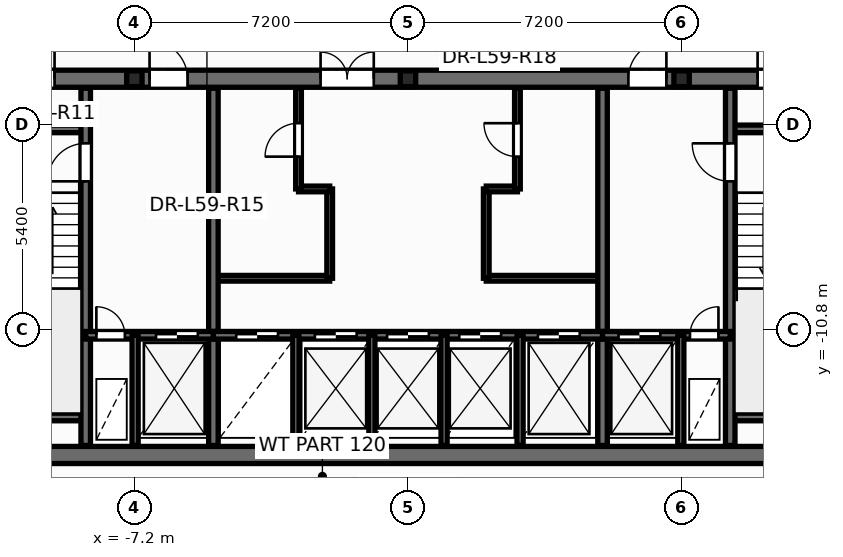
"""IFC4 building model, lengths in metres.
Left out: names, types, materials, properties, quantities, classifications, styles, units other than length and angle.
Written with IfcOpenShell. Run it as: python <this file> out.ifc"""

import sys

from ifc_helpers import new_model, si_unit, direction, frame, frame_2d, origin, origin_2d, place, context, subcontext, project, spatial, rectangle, i_section, extrude, element, fill, save


model = new_model("IFC4")
c1 = context("Model", 3, precision=1e-05, world=origin(), true_north=direction((0.0, 1.0)))
c2 = subcontext(c1, "Body", "Model", "MODEL_VIEW")
j1 = project(units=[si_unit("LENGTHUNIT", "METRE"), si_unit("PLANEANGLEUNIT", "RADIAN")], contexts=[c1])
p1 = place(None, origin())
s1 = spatial("IfcSite", under=j1, at=p1, CompositionType="ELEMENT")
p2 = place(p1, origin())
s2 = spatial("IfcBuilding", under=s1, at=p2, CompositionType="ELEMENT")
p3 = place(p2, frame((0.0, 0.0, 225.3)))
s3 = spatial("IfcBuildingStorey", under=s2, at=p3, CompositionType="ELEMENT", Elevation=225.3)
for number, where, z_axis, x_axis in (
    (1, (-7.2, -4.2, 0.0), (0.0, 0.0, 1.0), (1.0, 0.0, 0.0)),
    (2, (0.0, -4.2, 0.0), (0.0, 0.0, 1.0), (1.0, 0.0, 0.0)),
    (3, (7.2, -4.2, 0.0), (0.0, 0.0, 1.0), (1.0, 0.0, 0.0)),
):
    element("IfcColumn", number, at=place(p3, frame(where, z_axis=z_axis, x_axis=x_axis)), inside=s3, PredefinedType="PILASTER", context=c2, shape_type="SweptSolid", body=[
        extrude(i_section(OverallWidth=0.405, OverallDepth=0.414, WebThickness=0.022, FlangeThickness=0.032, at=origin_2d()), origin(), (0.0, 0.0, 1.0), 3.6),
    ])
p4 = place(p3, frame((-5.12, -9.45, 0.0), z_axis=(0.0, 0.0, 1.0), x_axis=(1.0, 0.0, 0.0)))
e4 = element("IfcWall", 4, at=p4, inside=s3, PredefinedType="PARTITIONING", context=c2, shape_type="SweptSolid", body=[
    extrude(rectangle(XDim=3.06, YDim=0.15, at=frame_2d((1.53, 0.0))), origin(), (0.0, 0.0, 1.0), 3.32),
])
p5 = place(p3, frame((-2.06, -9.45, 0.0), z_axis=(0.0, 0.0, 1.0), x_axis=(0.0, 1.0, 0.0)))
e5 = element("IfcWall", 5, at=p5, inside=s3, PredefinedType="PARTITIONING", context=c2, shape_type="SweptSolid", body=[
    extrude(rectangle(XDim=2.35, YDim=0.15, at=frame_2d((1.175, 0.0))), origin(), (0.0, 0.0, 1.0), 3.32),
])
p6 = place(p3, frame((-2.88, -7.1, 0.0), z_axis=(0.0, 0.0, 1.0), x_axis=(1.0, 0.0, 0.0)))
e6 = element("IfcWall", 6, at=p6, inside=s3, PredefinedType="PARTITIONING", context=c2, shape_type="SweptSolid", body=[
    extrude(rectangle(XDim=0.82, YDim=0.15, at=frame_2d((0.41, 0.0))), origin(), (0.0, 0.0, 1.0), 3.32),
])
p7 = place(p3, frame((-2.88, -7.1, 0.0), z_axis=(0.0, 0.0, 1.0), x_axis=(0.0, 1.0, 0.0)))
e7 = element("IfcWall", 7, at=p7, inside=s3, PredefinedType="PARTITIONING", context=c2, shape_type="SweptSolid", body=[
    extrude(rectangle(XDim=2.65, YDim=0.15, at=frame_2d((1.325, 0.0))), origin(), (0.0, 0.0, 1.0), 3.32),
])
p8 = place(p7, frame((0.85, 0.0, 0.0)))
e8 = element("IfcOpeningElement", 8, at=p8, cuts=e7, PredefinedType="OPENING", context=c2, shape_type="SweptSolid", body=[
    extrude(rectangle(XDim=0.886, YDim=2.104, at=frame_2d((0.44, 1.052))), frame((0.0, 0.085, 0.0), z_axis=(0.0, -1.0, 0.0), x_axis=(1.0, 0.0, 0.0)), (0.0, 0.0, 1.0), 0.17),
])
p9 = place(p3, frame((2.06, -9.45, 0.0), z_axis=(0.0, 0.0, 1.0), x_axis=(1.0, 0.0, 0.0)))
e9 = element("IfcWall", 9, at=p9, inside=s3, PredefinedType="PARTITIONING", context=c2, shape_type="SweptSolid", body=[
    extrude(rectangle(XDim=3.06, YDim=0.15, at=frame_2d((1.53, 0.0))), origin(), (0.0, 0.0, 1.0), 3.32),
])
p10 = place(p3, frame((2.06, -9.45, 0.0), z_axis=(0.0, 0.0, 1.0), x_axis=(0.0, 1.0, 0.0)))
e10 = element("IfcWall", 10, at=p10, inside=s3, PredefinedType="PARTITIONING", context=c2, shape_type="SweptSolid", body=[
    extrude(rectangle(XDim=2.35, YDim=0.15, at=frame_2d((1.175, 0.0))), origin(), (0.0, 0.0, 1.0), 3.32),
])
p11 = place(p3, frame((2.06, -7.1, 0.0), z_axis=(0.0, 0.0, 1.0), x_axis=(1.0, 0.0, 0.0)))
e11 = element("IfcWall", 11, at=p11, inside=s3, PredefinedType="PARTITIONING", context=c2, shape_type="SweptSolid", body=[
    extrude(rectangle(XDim=0.82, YDim=0.15, at=frame_2d((0.41, 0.0))), origin(), (0.0, 0.0, 1.0), 3.32),
])
p12 = place(p3, frame((2.88, -7.1, 0.0), z_axis=(0.0, 0.0, 1.0), x_axis=(0.0, 1.0, 0.0)))
e12 = element("IfcWall", 12, at=p12, inside=s3, PredefinedType="PARTITIONING", context=c2, shape_type="SweptSolid", body=[
    extrude(rectangle(XDim=2.65, YDim=0.15, at=frame_2d((1.325, 0.0))), origin(), (0.0, 0.0, 1.0), 3.32),
])
p13 = place(p12, frame((0.85, 0.0, 0.0)))
e13 = element("IfcOpeningElement", 13, at=p13, cuts=e12, PredefinedType="OPENING", context=c2, shape_type="SweptSolid", body=[
    extrude(rectangle(XDim=0.886, YDim=2.104, at=frame_2d((0.44, 1.052))), frame((0.0, 0.085, 0.0), z_axis=(0.0, -1.0, 0.0), x_axis=(1.0, 0.0, 0.0)), (0.0, 0.0, 1.0), 0.17),
])
p14 = place(p3, frame((-12.65, -14.1, 0.0), z_axis=(0.0, 0.0, 1.0), x_axis=(1.0, 0.0, 0.0)))
e14 = element("IfcWall", 14, at=p14, inside=s3, PredefinedType="SHEAR", context=c2, shape_type="SweptSolid", body=[
    extrude(rectangle(XDim=25.3, YDim=0.45, at=frame_2d((12.65, 0.0))), origin(), (0.0, 0.0, 1.0), 3.6),
])
p15 = place(p3, frame((-12.65, -4.2, 0.0), z_axis=(0.0, 0.0, 1.0), x_axis=(1.0, 0.0, 0.0)))
e15 = element("IfcWall", 15, at=p15, inside=s3, PredefinedType="SHEAR", context=c2, shape_type="SweptSolid", body=[
    extrude(rectangle(XDim=25.3, YDim=0.45, at=frame_2d((12.65, 0.0))), origin(), (0.0, 0.0, 1.0), 3.6),
])
p16 = place(p15, frame((0.95, 0.0, 0.0)))
e16 = element("IfcOpeningElement", 16, at=p16, cuts=e15, PredefinedType="OPENING", context=c2, shape_type="SweptSolid", body=[
    extrude(rectangle(XDim=0.756, YDim=2.054, at=frame_2d((0.375, 1.027))), frame((0.0, 0.235, 0.0), z_axis=(0.0, -1.0, 0.0), x_axis=(1.0, 0.0, 0.0)), (0.0, 0.0, 1.0), 0.47),
])
p17 = place(p15, frame((2.6, 0.0, 0.0)))
e17 = element("IfcOpeningElement", 17, at=p17, cuts=e15, PredefinedType="OPENING", context=c2, shape_type="SweptSolid", body=[
    extrude(rectangle(XDim=0.756, YDim=2.054, at=frame_2d((0.375, 1.027))), frame((0.0, 0.235, 0.0), z_axis=(0.0, -1.0, 0.0), x_axis=(1.0, 0.0, 0.0)), (0.0, 0.0, 1.0), 0.47),
])
p18 = place(p15, frame((21.85, 0.0, 0.0)))
e18 = element("IfcOpeningElement", 18, at=p18, cuts=e15, PredefinedType="OPENING", context=c2, shape_type="SweptSolid", body=[
    extrude(rectangle(XDim=0.756, YDim=2.054, at=frame_2d((0.375, 1.027))), frame((0.0, 0.235, 0.0), z_axis=(0.0, -1.0, 0.0), x_axis=(1.0, 0.0, 0.0)), (0.0, 0.0, 1.0), 0.47),
])
p19 = place(p15, frame((23.5, 0.0, 0.0)))
e19 = element("IfcOpeningElement", 19, at=p19, cuts=e15, PredefinedType="OPENING", context=c2, shape_type="SweptSolid", body=[
    extrude(rectangle(XDim=0.756, YDim=2.054, at=frame_2d((0.375, 1.027))), frame((0.0, 0.235, 0.0), z_axis=(0.0, -1.0, 0.0), x_axis=(1.0, 0.0, 0.0)), (0.0, 0.0, 1.0), 0.47),
])
p20 = place(p15, frame((5.85, 0.0, 0.0)))
e20 = element("IfcOpeningElement", 20, at=p20, cuts=e15, PredefinedType="OPENING", context=c2, shape_type="SweptSolid", body=[
    extrude(rectangle(XDim=1.006, YDim=2.104, at=frame_2d((0.5, 1.052))), frame((0.0, 0.235, 0.0), z_axis=(0.0, -1.0, 0.0), x_axis=(1.0, 0.0, 0.0)), (0.0, 0.0, 1.0), 0.47),
])
p21 = place(p15, frame((10.35, 0.0, 0.0)))
e21 = element("IfcOpeningElement", 21, at=p21, cuts=e15, PredefinedType="OPENING", context=c2, shape_type="SweptSolid", body=[
    extrude(rectangle(XDim=1.406, YDim=2.154, at=frame_2d((0.7, 1.077))), frame((0.0, 0.235, 0.0), z_axis=(0.0, -1.0, 0.0), x_axis=(1.0, 0.0, 0.0)), (0.0, 0.0, 1.0), 0.47),
])
p22 = place(p15, frame((18.45, 0.0, 0.0)))
e22 = element("IfcOpeningElement", 22, at=p22, cuts=e15, PredefinedType="OPENING", context=c2, shape_type="SweptSolid", body=[
    extrude(rectangle(XDim=1.006, YDim=2.104, at=frame_2d((0.5, 1.052))), frame((0.0, 0.235, 0.0), z_axis=(0.0, -1.0, 0.0), x_axis=(1.0, 0.0, 0.0)), (0.0, 0.0, 1.0), 0.47),
])
for number, where, z_axis, x_axis in (
    (23, (-12.35, -5.52, 0.0), (0.0, 0.0, 1.0), (1.0, 0.0, 0.0)),
    (24, (-12.35, -13.1, 0.0), (0.0, 0.0, 1.0), (1.0, 0.0, 0.0)),
    (25, (8.48, -5.52, 0.0), (0.0, 0.0, 1.0), (1.0, 0.0, 0.0)),
    (26, (8.48, -13.1, 0.0), (0.0, 0.0, 1.0), (1.0, 0.0, 0.0)),
):
    element("IfcWall", number, at=place(p3, frame(where, z_axis=z_axis, x_axis=x_axis)), inside=s3, PredefinedType="SOLIDWALL", context=c2, shape_type="SweptSolid", body=[
        extrude(rectangle(XDim=3.87, YDim=0.2, at=frame_2d((1.935, 0.0))), origin(), (0.0, 0.0, 1.0), 3.6),
    ])
p23 = place(p3, frame((-8.48, -13.85, 0.0), z_axis=(0.0, 0.0, 1.0), x_axis=(0.0, 1.0, 0.0)))
e27 = element("IfcWall", 27, at=p23, inside=s3, PredefinedType="SHEAR", context=c2, shape_type="SweptSolid", body=[
    extrude(rectangle(XDim=9.4, YDim=0.25, at=frame_2d((4.7, 0.0))), origin(), (0.0, 0.0, 1.0), 3.6),
])
p24 = place(p23, frame((6.95, 0.0, 0.0)))
e28 = element("IfcOpeningElement", 28, at=p24, cuts=e27, PredefinedType="OPENING", context=c2, shape_type="SweptSolid", body=[
    extrude(rectangle(XDim=1.006, YDim=2.104, at=frame_2d((0.5, 1.052))), frame((0.0, 0.135, 0.0), z_axis=(0.0, -1.0, 0.0), x_axis=(1.0, 0.0, 0.0)), (0.0, 0.0, 1.0), 0.27),
])
p25 = place(p3, frame((8.48, -13.85, 0.0), z_axis=(0.0, 0.0, 1.0), x_axis=(0.0, 1.0, 0.0)))
e29 = element("IfcWall", 29, at=p25, inside=s3, PredefinedType="SHEAR", context=c2, shape_type="SweptSolid", body=[
    extrude(rectangle(XDim=9.4, YDim=0.25, at=frame_2d((4.7, 0.0))), origin(), (0.0, 0.0, 1.0), 3.6),
])
p26 = place(p25, frame((6.95, 0.0, 0.0)))
e30 = element("IfcOpeningElement", 30, at=p26, cuts=e29, PredefinedType="OPENING", context=c2, shape_type="SweptSolid", body=[
    extrude(rectangle(XDim=1.006, YDim=2.104, at=frame_2d((0.5, 1.052))), frame((0.0, 0.135, 0.0), z_axis=(0.0, -1.0, 0.0), x_axis=(1.0, 0.0, 0.0)), (0.0, 0.0, 1.0), 0.27),
])
for number, where, z_axis, x_axis in (
    (31, (-5.12, -13.85, 0.0), (0.0, 0.0, 1.0), (0.0, 1.0, 0.0)),
    (32, (5.12, -13.85, 0.0), (0.0, 0.0, 1.0), (0.0, 1.0, 0.0)),
):
    element("IfcWall", number, at=place(p3, frame(where, z_axis=z_axis, x_axis=x_axis)), inside=s3, PredefinedType="SHEAR", context=c2, shape_type="SweptSolid", body=[
        extrude(rectangle(XDim=9.4, YDim=0.25, at=frame_2d((4.7, 0.0))), origin(), (0.0, 0.0, 1.0), 3.6),
    ])
p27 = place(p3, frame((-8.48, -10.95, 0.0), z_axis=(0.0, 0.0, 1.0), x_axis=(1.0, 0.0, 0.0)))
e33 = element("IfcWall", 33, at=p27, inside=s3, PredefinedType="SOLIDWALL", context=c2, shape_type="SweptSolid", body=[
    extrude(rectangle(XDim=3.36, YDim=0.2, at=frame_2d((1.68, 0.0))), origin(), (0.0, 0.0, 1.0), 3.6),
])
p28 = place(p27, frame((0.28, 0.0, 0.0)))
e34 = element("IfcOpeningElement", 34, at=p28, cuts=e33, PredefinedType="OPENING", context=c2, shape_type="SweptSolid", body=[
    extrude(rectangle(XDim=0.756, YDim=2.054, at=frame_2d((0.375, 1.027))), frame((0.0, 0.11, 0.0), z_axis=(0.0, -1.0, 0.0), x_axis=(1.0, 0.0, 0.0)), (0.0, 0.0, 1.0), 0.22),
])
p29 = place(p27, frame((1.85, 0.0, 0.0)))
e35 = element("IfcOpeningElement", 35, at=p29, cuts=e33, PredefinedType="OPENING", context=c2, shape_type="SweptSolid", body=[
    extrude(rectangle(XDim=1.106, YDim=2.104, at=frame_2d((0.55, 1.052))), frame((0.0, 0.11, 0.0), z_axis=(0.0, -1.0, 0.0), x_axis=(1.0, 0.0, 0.0)), (0.0, 0.0, 1.0), 0.22),
])
p30 = place(p3, frame((-5.12, -10.95, 0.0), z_axis=(0.0, 0.0, 1.0), x_axis=(1.0, 0.0, 0.0)))
e36 = element("IfcWall", 36, at=p30, inside=s3, PredefinedType="SOLIDWALL", context=c2, shape_type="SweptSolid", body=[
    extrude(rectangle(XDim=10.24, YDim=0.2, at=frame_2d((5.12, 0.0))), origin(), (0.0, 0.0, 1.0), 3.6),
])
p31 = place(p30, frame((0.6, 0.0, 0.0)))
e37 = element("IfcOpeningElement", 37, at=p31, cuts=e36, PredefinedType="OPENING", context=c2, shape_type="SweptSolid", body=[
    extrude(rectangle(XDim=1.106, YDim=2.104, at=frame_2d((0.55, 1.052))), frame((0.0, 0.11, 0.0), z_axis=(0.0, -1.0, 0.0), x_axis=(1.0, 0.0, 0.0)), (0.0, 0.0, 1.0), 0.22),
])
p32 = place(p30, frame((2.67, 0.0, 0.0)))
e38 = element("IfcOpeningElement", 38, at=p32, cuts=e36, PredefinedType="OPENING", context=c2, shape_type="SweptSolid", body=[
    extrude(rectangle(XDim=1.106, YDim=2.104, at=frame_2d((0.55, 1.052))), frame((0.0, 0.11, 0.0), z_axis=(0.0, -1.0, 0.0), x_axis=(1.0, 0.0, 0.0)), (0.0, 0.0, 1.0), 0.22),
])
p33 = place(p30, frame((4.57, 0.0, 0.0)))
e39 = element("IfcOpeningElement", 39, at=p33, cuts=e36, PredefinedType="OPENING", context=c2, shape_type="SweptSolid", body=[
    extrude(rectangle(XDim=1.106, YDim=2.104, at=frame_2d((0.55, 1.052))), frame((0.0, 0.11, 0.0), z_axis=(0.0, -1.0, 0.0), x_axis=(1.0, 0.0, 0.0)), (0.0, 0.0, 1.0), 0.22),
])
p34 = place(p30, frame((6.47, 0.0, 0.0)))
e40 = element("IfcOpeningElement", 40, at=p34, cuts=e36, PredefinedType="OPENING", context=c2, shape_type="SweptSolid", body=[
    extrude(rectangle(XDim=1.106, YDim=2.104, at=frame_2d((0.55, 1.052))), frame((0.0, 0.11, 0.0), z_axis=(0.0, -1.0, 0.0), x_axis=(1.0, 0.0, 0.0)), (0.0, 0.0, 1.0), 0.22),
])
p35 = place(p30, frame((8.54, 0.0, 0.0)))
e41 = element("IfcOpeningElement", 41, at=p35, cuts=e36, PredefinedType="OPENING", context=c2, shape_type="SweptSolid", body=[
    extrude(rectangle(XDim=1.106, YDim=2.104, at=frame_2d((0.55, 1.052))), frame((0.0, 0.11, 0.0), z_axis=(0.0, -1.0, 0.0), x_axis=(1.0, 0.0, 0.0)), (0.0, 0.0, 1.0), 0.22),
])
p36 = place(p3, frame((5.12, -10.95, 0.0), z_axis=(0.0, 0.0, 1.0), x_axis=(1.0, 0.0, 0.0)))
e42 = element("IfcWall", 42, at=p36, inside=s3, PredefinedType="SOLIDWALL", context=c2, shape_type="SweptSolid", body=[
    extrude(rectangle(XDim=3.36, YDim=0.2, at=frame_2d((1.68, 0.0))), origin(), (0.0, 0.0, 1.0), 3.6),
])
p37 = place(p36, frame((0.42, 0.0, 0.0)))
e43 = element("IfcOpeningElement", 43, at=p37, cuts=e42, PredefinedType="OPENING", context=c2, shape_type="SweptSolid", body=[
    extrude(rectangle(XDim=1.106, YDim=2.104, at=frame_2d((0.55, 1.052))), frame((0.0, 0.11, 0.0), z_axis=(0.0, -1.0, 0.0), x_axis=(1.0, 0.0, 0.0)), (0.0, 0.0, 1.0), 0.22),
])
p38 = place(p36, frame((2.3, 0.0, 0.0)))
e44 = element("IfcOpeningElement", 44, at=p38, cuts=e42, PredefinedType="OPENING", context=c2, shape_type="SweptSolid", body=[
    extrude(rectangle(XDim=0.756, YDim=2.054, at=frame_2d((0.375, 1.027))), frame((0.0, 0.11, 0.0), z_axis=(0.0, -1.0, 0.0), x_axis=(1.0, 0.0, 0.0)), (0.0, 0.0, 1.0), 0.22),
])
for number, where, z_axis, x_axis in (
    (45, (-7.18, -13.85, 0.0), (0.0, 0.0, 1.0), (0.0, 1.0, 0.0)),
    (46, (7.18, -13.85, 0.0), (0.0, 0.0, 1.0), (0.0, 1.0, 0.0)),
    (47, (-2.95, -13.85, 0.0), (0.0, 0.0, 1.0), (0.0, 1.0, 0.0)),
    (48, (2.95, -13.85, 0.0), (0.0, 0.0, 1.0), (0.0, 1.0, 0.0)),
    (49, (-0.95, -13.85, 0.0), (0.0, 0.0, 1.0), (0.0, 1.0, 0.0)),
    (50, (0.95, -13.85, 0.0), (0.0, 0.0, 1.0), (0.0, 1.0, 0.0)),
):
    element("IfcWall", number, at=place(p3, frame(where, z_axis=z_axis, x_axis=x_axis)), inside=s3, PredefinedType="PARTITIONING", context=c2, shape_type="SweptSolid", body=[
        extrude(rectangle(XDim=2.9, YDim=0.16, at=frame_2d((1.45, 0.0))), origin(), (0.0, 0.0, 1.0), 2.545),
    ])
p39 = place(p8, origin())
e51 = element("IfcDoor", 51, at=p39, inside=s3, OperationType="SINGLE_SWING_LEFT", PredefinedType="DOOR", context=c2, shape_type="SweptSolid", body=[
    extrude(rectangle(XDim=0.88, YDim=2.1, at=frame_2d((0.44, 1.05))), frame((0.0, 0.025, 0.0), z_axis=(0.0, -1.0, 0.0), x_axis=(1.0, 0.0, 0.0)), (0.0, 0.0, 1.0), 0.05),
])
fill(e8, e51)
p40 = place(p13, origin())
e52 = element("IfcDoor", 52, at=p40, inside=s3, OperationType="SINGLE_SWING_RIGHT", PredefinedType="DOOR", context=c2, shape_type="SweptSolid", body=[
    extrude(rectangle(XDim=0.88, YDim=2.1, at=frame_2d((0.44, 1.05))), frame((0.0, 0.025, 0.0), z_axis=(0.0, -1.0, 0.0), x_axis=(1.0, 0.0, 0.0)), (0.0, 0.0, 1.0), 0.05),
])
fill(e13, e52)
p41 = place(p24, origin())
e53 = element("IfcDoor", 53, at=p41, inside=s3, OperationType="SINGLE_SWING_LEFT", PredefinedType="DOOR", context=c2, shape_type="SweptSolid", body=[
    extrude(rectangle(XDim=1.0, YDim=2.1, at=frame_2d((0.5, 1.05))), frame((0.0, 0.025, 0.0), z_axis=(0.0, -1.0, 0.0), x_axis=(1.0, 0.0, 0.0)), (0.0, 0.0, 1.0), 0.05),
])
fill(e28, e53)
p42 = place(p26, origin())
e54 = element("IfcDoor", 54, at=p42, inside=s3, OperationType="SINGLE_SWING_RIGHT", PredefinedType="DOOR", context=c2, shape_type="SweptSolid", body=[
    extrude(rectangle(XDim=1.0, YDim=2.1, at=frame_2d((0.5, 1.05))), frame((0.0, 0.025, 0.0), z_axis=(0.0, -1.0, 0.0), x_axis=(1.0, 0.0, 0.0)), (0.0, 0.0, 1.0), 0.05),
])
fill(e30, e54)
p43 = place(p28, origin())
e55 = element("IfcDoor", 55, at=p43, inside=s3, OperationType="SINGLE_SWING_LEFT", PredefinedType="DOOR", context=c2, shape_type="SweptSolid", body=[
    extrude(rectangle(XDim=0.75, YDim=2.05, at=frame_2d((0.375, 1.025))), frame((0.0, 0.025, 0.0), z_axis=(0.0, -1.0, 0.0), x_axis=(1.0, 0.0, 0.0)), (0.0, 0.0, 1.0), 0.05),
])
fill(e34, e55)
p44 = place(p29, origin())
e56 = element("IfcDoor", 56, at=p44, inside=s3, OperationType="DOUBLE_DOOR_SLIDING", PredefinedType="DOOR", context=c2, shape_type="SweptSolid", body=[
    extrude(rectangle(XDim=1.1, YDim=2.1, at=frame_2d((0.55, 1.05))), frame((0.0, 0.025, 0.0), z_axis=(0.0, -1.0, 0.0), x_axis=(1.0, 0.0, 0.0)), (0.0, 0.0, 1.0), 0.05),
])
fill(e35, e56)
p45 = place(p37, origin())
e57 = element("IfcDoor", 57, at=p45, inside=s3, OperationType="DOUBLE_DOOR_SLIDING", PredefinedType="DOOR", context=c2, shape_type="SweptSolid", body=[
    extrude(rectangle(XDim=1.1, YDim=2.1, at=frame_2d((0.55, 1.05))), frame((0.0, 0.025, 0.0), z_axis=(0.0, -1.0, 0.0), x_axis=(1.0, 0.0, 0.0)), (0.0, 0.0, 1.0), 0.05),
])
fill(e43, e57)
p46 = place(p38, origin())
e58 = element("IfcDoor", 58, at=p46, inside=s3, OperationType="SINGLE_SWING_RIGHT", PredefinedType="DOOR", context=c2, shape_type="SweptSolid", body=[
    extrude(rectangle(XDim=0.75, YDim=2.05, at=frame_2d((0.375, 1.025))), frame((0.0, 0.025, 0.0), z_axis=(0.0, -1.0, 0.0), x_axis=(1.0, 0.0, 0.0)), (0.0, 0.0, 1.0), 0.05),
])
fill(e44, e58)
p47 = place(p31, origin())
e59 = element("IfcDoor", 59, at=p47, inside=s3, OperationType="DOUBLE_DOOR_SLIDING", PredefinedType="DOOR", context=c2, shape_type="SweptSolid", body=[
    extrude(rectangle(XDim=1.1, YDim=2.1, at=frame_2d((0.55, 1.05))), frame((0.0, 0.025, 0.0), z_axis=(0.0, -1.0, 0.0), x_axis=(1.0, 0.0, 0.0)), (0.0, 0.0, 1.0), 0.05),
])
fill(e37, e59)
p48 = place(p32, origin())
e60 = element("IfcDoor", 60, at=p48, inside=s3, OperationType="DOUBLE_DOOR_SLIDING", PredefinedType="DOOR", context=c2, shape_type="SweptSolid", body=[
    extrude(rectangle(XDim=1.1, YDim=2.1, at=frame_2d((0.55, 1.05))), frame((0.0, 0.025, 0.0), z_axis=(0.0, -1.0, 0.0), x_axis=(1.0, 0.0, 0.0)), (0.0, 0.0, 1.0), 0.05),
])
fill(e38, e60)
p49 = place(p33, origin())
e61 = element("IfcDoor", 61, at=p49, inside=s3, OperationType="DOUBLE_DOOR_SLIDING", PredefinedType="DOOR", context=c2, shape_type="SweptSolid", body=[
    extrude(rectangle(XDim=1.1, YDim=2.1, at=frame_2d((0.55, 1.05))), frame((0.0, 0.025, 0.0), z_axis=(0.0, -1.0, 0.0), x_axis=(1.0, 0.0, 0.0)), (0.0, 0.0, 1.0), 0.05),
])
fill(e39, e61)
p50 = place(p34, origin())
e62 = element("IfcDoor", 62, at=p50, inside=s3, OperationType="DOUBLE_DOOR_SLIDING", PredefinedType="DOOR", context=c2, shape_type="SweptSolid", body=[
    extrude(rectangle(XDim=1.1, YDim=2.1, at=frame_2d((0.55, 1.05))), frame((0.0, 0.025, 0.0), z_axis=(0.0, -1.0, 0.0), x_axis=(1.0, 0.0, 0.0)), (0.0, 0.0, 1.0), 0.05),
])
fill(e40, e62)
p51 = place(p35, origin())
e63 = element("IfcDoor", 63, at=p51, inside=s3, OperationType="DOUBLE_DOOR_SLIDING", PredefinedType="DOOR", context=c2, shape_type="SweptSolid", body=[
    extrude(rectangle(XDim=1.1, YDim=2.1, at=frame_2d((0.55, 1.05))), frame((0.0, 0.025, 0.0), z_axis=(0.0, -1.0, 0.0), x_axis=(1.0, 0.0, 0.0)), (0.0, 0.0, 1.0), 0.05),
])
fill(e41, e63)
p52 = place(p17, origin())
e64 = element("IfcDoor", 64, at=p52, inside=s3, OperationType="SINGLE_SWING_RIGHT", PredefinedType="DOOR", context=c2, shape_type="SweptSolid", body=[
    extrude(rectangle(XDim=0.75, YDim=2.05, at=frame_2d((0.375, 1.025))), frame((0.0, 0.025, 0.0), z_axis=(0.0, -1.0, 0.0), x_axis=(1.0, 0.0, 0.0)), (0.0, 0.0, 1.0), 0.05),
])
fill(e17, e64)
p53 = place(p18, origin())
e65 = element("IfcDoor", 65, at=p53, inside=s3, OperationType="SINGLE_SWING_LEFT", PredefinedType="DOOR", context=c2, shape_type="SweptSolid", body=[
    extrude(rectangle(XDim=0.75, YDim=2.05, at=frame_2d((0.375, 1.025))), frame((0.0, 0.025, 0.0), z_axis=(0.0, -1.0, 0.0), x_axis=(1.0, 0.0, 0.0)), (0.0, 0.0, 1.0), 0.05),
])
fill(e18, e65)
p54 = place(p20, origin())
e66 = element("IfcDoor", 66, at=p54, inside=s3, OperationType="SINGLE_SWING_LEFT", PredefinedType="DOOR", context=c2, shape_type="SweptSolid", body=[
    extrude(rectangle(XDim=1.0, YDim=2.1, at=frame_2d((0.5, 1.05))), frame((0.0, 0.025, 0.0), z_axis=(0.0, -1.0, 0.0), x_axis=(1.0, 0.0, 0.0)), (0.0, 0.0, 1.0), 0.05),
])
fill(e20, e66)
p55 = place(p21, origin())
e67 = element("IfcDoor", 67, at=p55, inside=s3, OperationType="DOUBLE_DOOR_SINGLE_SWING", PredefinedType="DOOR", context=c2, shape_type="SweptSolid", body=[
    extrude(rectangle(XDim=1.4, YDim=2.15, at=frame_2d((0.7, 1.075))), frame((0.0, 0.025, 0.0), z_axis=(0.0, -1.0, 0.0), x_axis=(1.0, 0.0, 0.0)), (0.0, 0.0, 1.0), 0.05),
])
fill(e21, e67)
p56 = place(p22, origin())
e68 = element("IfcDoor", 68, at=p56, inside=s3, OperationType="SINGLE_SWING_RIGHT", PredefinedType="DOOR", context=c2, shape_type="SweptSolid", body=[
    extrude(rectangle(XDim=1.0, YDim=2.1, at=frame_2d((0.5, 1.05))), frame((0.0, 0.025, 0.0), z_axis=(0.0, -1.0, 0.0), x_axis=(1.0, 0.0, 0.0)), (0.0, 0.0, 1.0), 0.05),
])
fill(e22, e68)
save(model, sys.argv[1])
